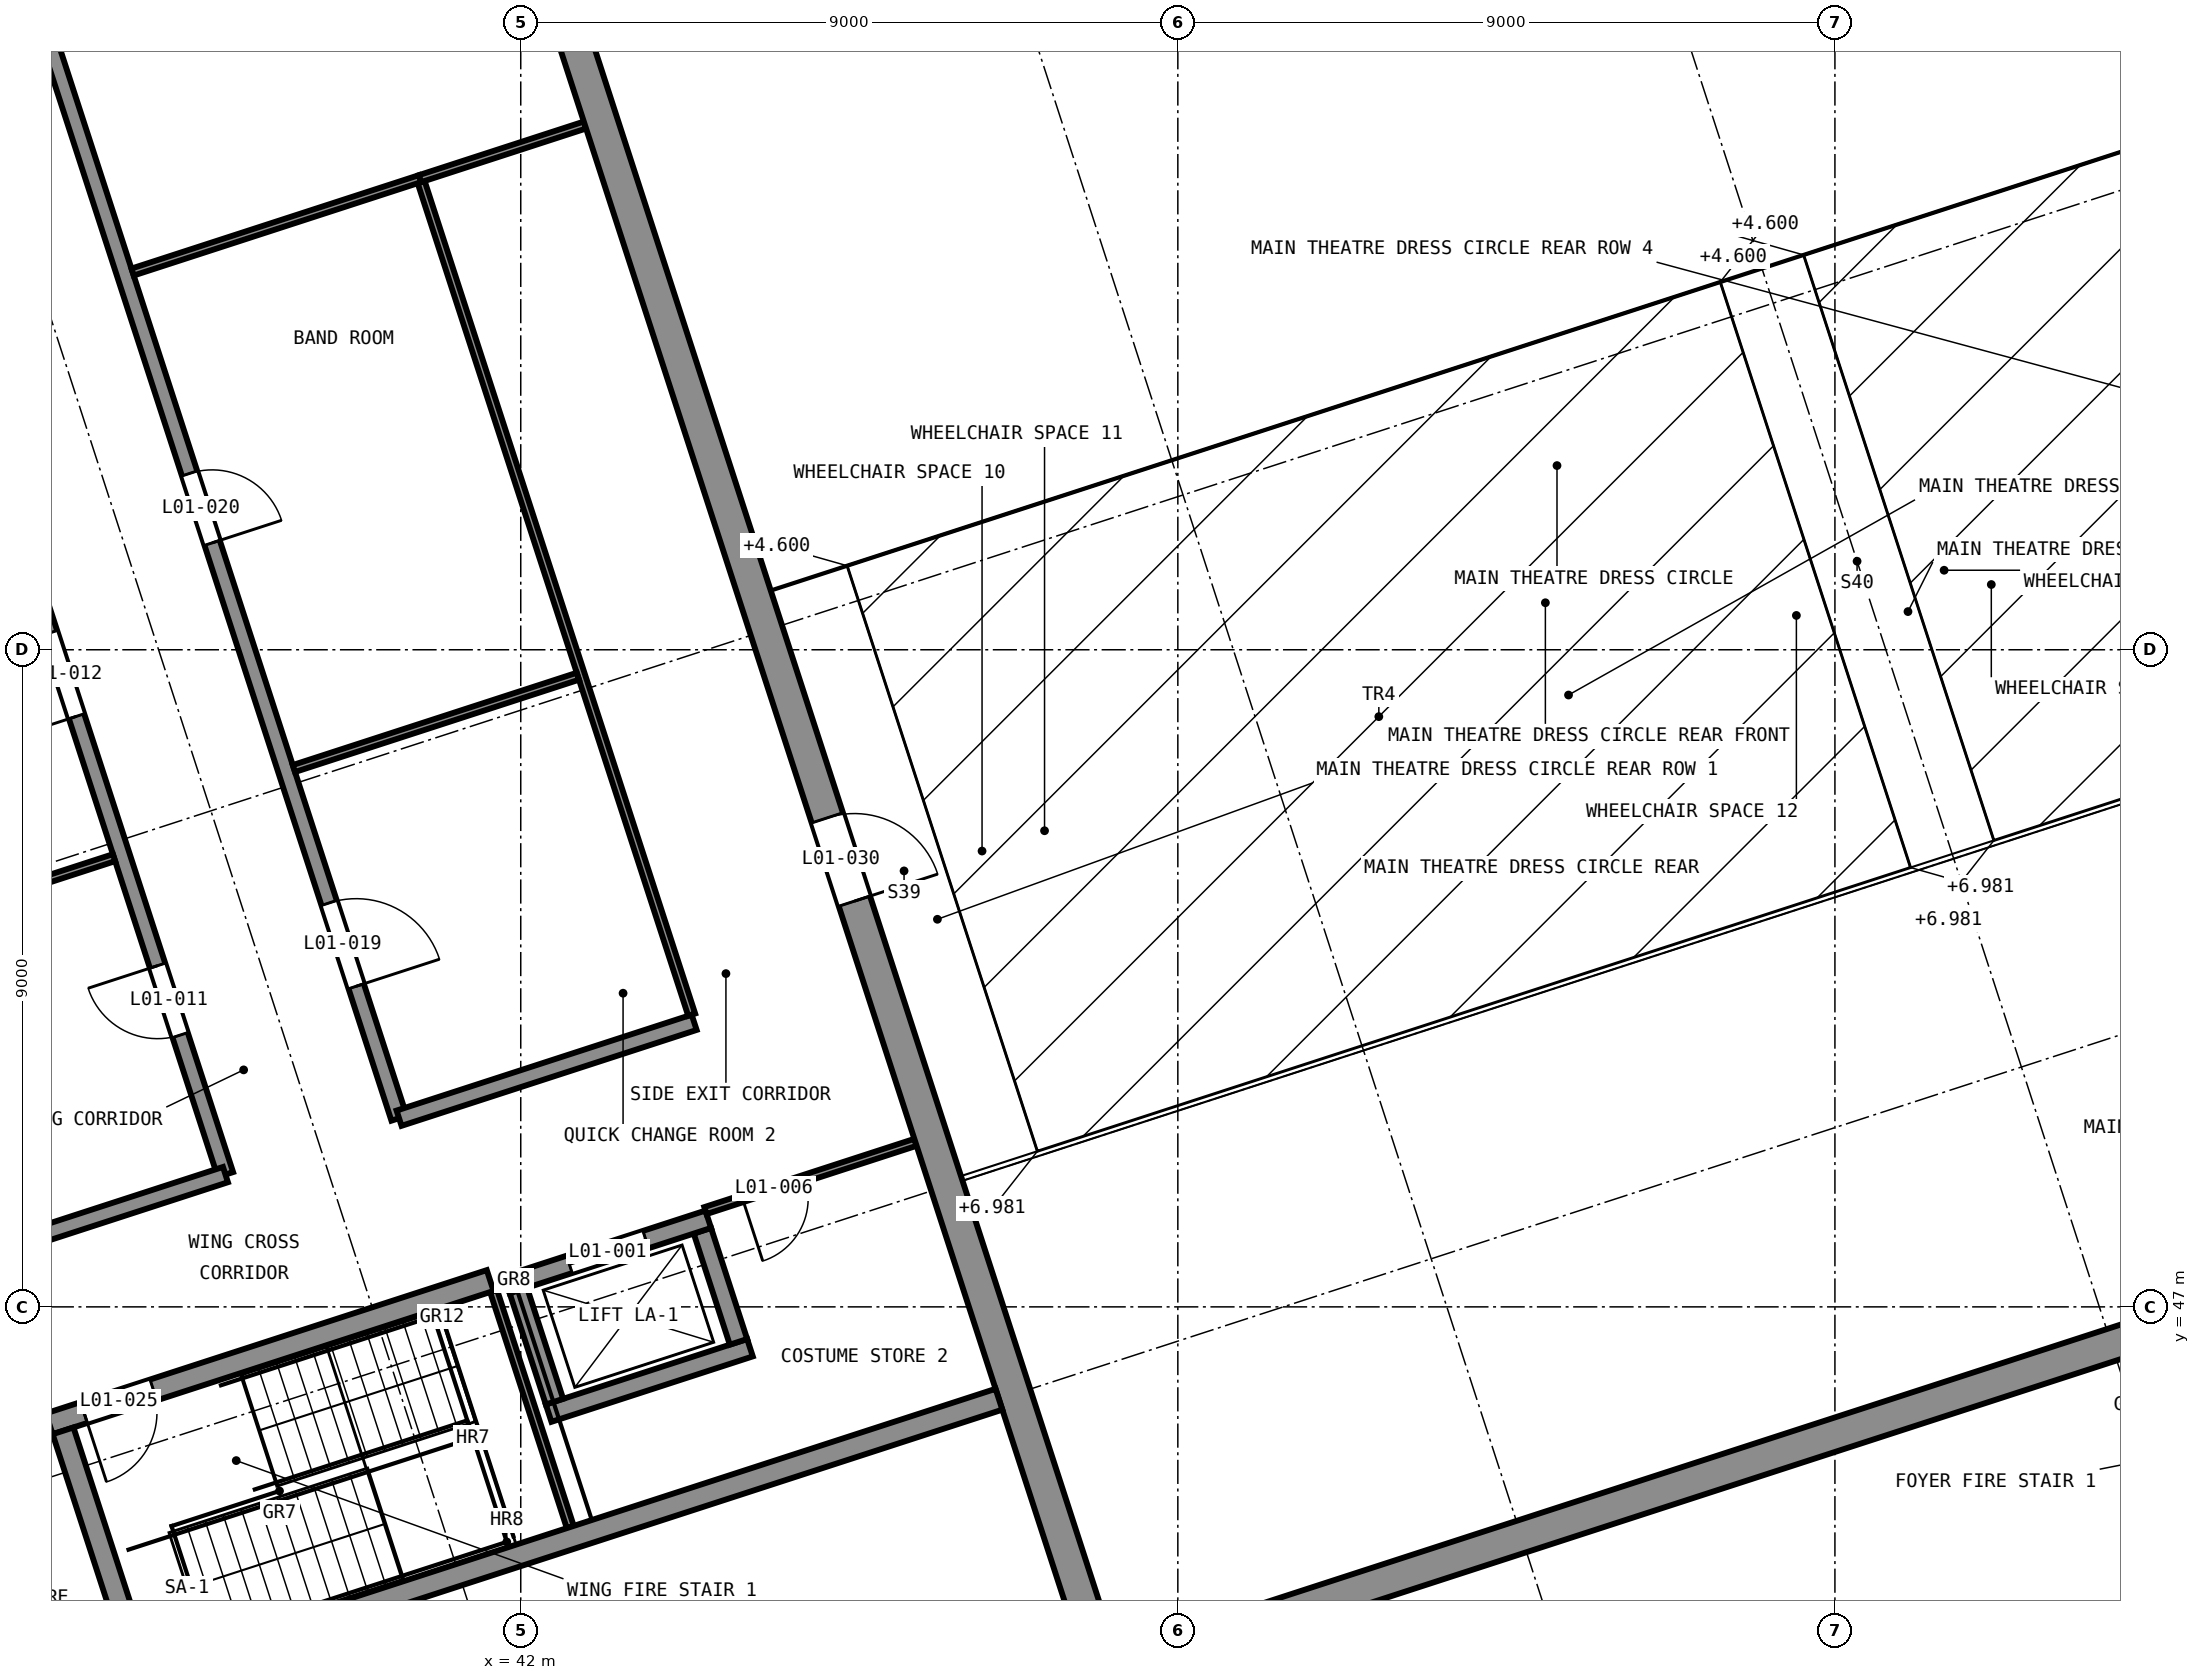
"""IFC4 building model, lengths in metres.
Left out: names, types, materials, properties, quantities, classifications, styles, units other than length and angle.
Written with IfcOpenShell. Run it as: python <this file> out.ifc"""

import sys

from ifc_helpers import new_model, si_unit, direction, frame, frame_2d, origin, place, context, subcontext, project, spatial, rectangle, extrude, element, fill, save


model = new_model("IFC4")
c1 = context("Model", 3, precision=1e-05, world=origin(), true_north=direction((0.0, 1.0)))
c2 = subcontext(c1, "Body", "Model", "MODEL_VIEW")
j1 = project(units=[si_unit("LENGTHUNIT", "METRE"), si_unit("PLANEANGLEUNIT", "RADIAN")], contexts=[c1])
p1 = place(None, origin())
s1 = spatial("IfcSite", under=j1, at=p1, CompositionType="ELEMENT")
p2 = place(p1, origin())
s2 = spatial("IfcBuilding", under=s1, at=p2, CompositionType="ELEMENT")
p3 = place(p2, frame((0.0, 0.0, 5.5)))
s3 = spatial("IfcBuildingStorey", under=s2, at=p3, CompositionType="ELEMENT", Elevation=5.5)
p4 = place(p3, frame((49.786, 41.93, 0.0), z_axis=(0.0, 0.0, 1.0), x_axis=(0.951055937194, 0.309018776661, 0.0)))
e1 = element("IfcWall", 1, at=p4, inside=s3, PredefinedType="SHEAR", context=c2, shape_type="SweptSolid", body=[
    extrude(rectangle(XDim=29.45, YDim=0.45, at=frame_2d((14.725, 0.0))), origin(), (0.0, 0.0, 1.0), 4.0),
])
p5 = place(p3, frame((49.93, 42.214, 0.0), z_axis=(0.0, 0.0, 1.0), x_axis=(-0.309016215614, 0.95105676933, 0.0)))
e2 = element("IfcWall", 2, at=p5, inside=s3, PredefinedType="SHEAR", context=c2, shape_type="SweptSolid", body=[
    extrude(rectangle(XDim=27.975, YDim=0.45, at=frame_2d((13.988, 0.0))), origin(), (0.0, 0.0, 1.0), 4.0),
])
p6 = place(p5, frame((10.875, 0.0, 0.0)))
e3 = element("IfcOpeningElement", 3, at=p6, cuts=e2, PredefinedType="OPENING", context=c2, shape_type="SweptSolid", body=[
    extrude(rectangle(XDim=1.2, YDim=2.1, at=frame_2d((0.6, 1.05))), frame((0.0, 0.235, 0.0), z_axis=(0.0, -1.0, 0.0), x_axis=(1.0, 0.0, 0.0)), (0.0, 0.0, 1.0), 0.47),
])
p7 = place(p3, frame((48.55, 45.735, 0.0), z_axis=(0.0, 0.0, 1.0), x_axis=(-0.951061216338, -0.309002528757, 0.0)))
e4 = element("IfcWall", 4, at=p7, inside=s3, PredefinedType="SOLIDWALL", context=c2, shape_type="SweptSolid", body=[
    extrude(rectangle(XDim=15.925, YDim=0.3, at=frame_2d((7.962, 0.0))), origin(), (0.0, 0.0, 1.0), 4.0),
])
p8 = place(p3, frame((41.581, 47.361, 0.0), z_axis=(0.0, 0.0, 1.0), x_axis=(-0.951058929949, -0.309009565815, 0.0)))
e5 = element("IfcWall", 5, at=p8, inside=s3, PredefinedType="SOLIDWALL", context=c2, shape_type="SweptSolid", body=[
    extrude(rectangle(XDim=6.35, YDim=0.3, at=frame_2d((3.175, 0.0))), origin(), (0.0, 0.0, 1.0), 3.7),
])
p9 = place(p8, frame((4.85, 0.0, 0.0)))
e6 = element("IfcOpeningElement", 6, at=p9, cuts=e5, PredefinedType="OPENING", context=c2, shape_type="SweptSolid", body=[
    extrude(rectangle(XDim=1.0, YDim=2.1, at=frame_2d((0.5, 1.05))), frame((0.0, 0.16, 0.0), z_axis=(0.0, -1.0, 0.0), x_axis=(1.0, 0.0, 0.0)), (0.0, 0.0, 1.0), 0.32),
])
p10 = place(p3, frame((35.731, 45.302, 0.0), z_axis=(0.0, 0.0, 1.0), x_axis=(0.308980533303, -0.951068362443, 0.0)))
e7 = element("IfcWall", 7, at=p10, inside=s3, PredefinedType="SOLIDWALL", context=c2, shape_type="SweptSolid", body=[
    extrude(rectangle(XDim=3.4, YDim=0.3, at=frame_2d((1.7, 0.0))), origin(), (0.0, 0.0, 1.0), 3.7),
])
p11 = place(p3, frame((42.382, 45.544, 0.0), z_axis=(0.0, 0.0, 1.0), x_axis=(0.951071801089, 0.308969948659, 0.0)))
e8 = element("IfcWall", 8, at=p11, inside=s3, PredefinedType="SHEAR", context=c2, shape_type="SweptSolid", body=[
    extrude(rectangle(XDim=2.9, YDim=0.25, at=frame_2d((1.45, 0.0))), origin(), (0.0, 0.0, 1.0), 4.0),
])
p12 = place(p3, frame((44.982, 46.521, 0.0), z_axis=(0.0, 0.0, 1.0), x_axis=(-0.308986014439, 0.951066581729, 0.0)))
e9 = element("IfcWall", 9, at=p12, inside=s3, PredefinedType="SHEAR", context=c2, shape_type="SweptSolid", body=[
    extrude(rectangle(XDim=1.6, YDim=0.25, at=frame_2d((0.8, 0.0))), origin(), (0.0, 0.0, 1.0), 4.0),
])
p13 = place(p3, frame((44.568, 48.2, 0.0), z_axis=(0.0, 0.0, 1.0), x_axis=(-0.951047059821, -0.309046096893, 0.0)))
e10 = element("IfcWall", 10, at=p13, inside=s3, PredefinedType="SHEAR", context=c2, shape_type="SweptSolid", body=[
    extrude(rectangle(XDim=2.9, YDim=0.25, at=frame_2d((1.45, 0.0))), origin(), (0.0, 0.0, 1.0), 4.0),
])
p14 = place(p13, frame((0.9, 0.0, 0.0)))
e11 = element("IfcOpeningElement", 11, at=p14, cuts=e10, PredefinedType="OPENING", context=c2, shape_type="SweptSolid", body=[
    extrude(rectangle(XDim=1.1, YDim=2.1, at=frame_2d((0.55, 1.05))), frame((0.0, 0.135, 0.0), z_axis=(0.0, -1.0, 0.0), x_axis=(1.0, 0.0, 0.0)), (0.0, 0.0, 1.0), 0.27),
])
p15 = place(p3, frame((41.968, 47.224, 0.0), z_axis=(0.0, 0.0, 1.0), x_axis=(0.308986014439, -0.951066581729, 0.0)))
e12 = element("IfcWall", 12, at=p15, inside=s3, PredefinedType="SHEAR", context=c2, shape_type="SweptSolid", body=[
    extrude(rectangle(XDim=1.6, YDim=0.25, at=frame_2d((0.8, 0.0))), origin(), (0.0, 0.0, 1.0), 4.0),
])
p16 = place(p3, frame((37.956, 48.812, 0.0), z_axis=(0.0, 0.0, 1.0), x_axis=(-0.30901736393, 0.951056396219, 0.0)))
e13 = element("IfcWall", 13, at=p16, inside=s3, PredefinedType="SOLIDWALL", context=c2, shape_type="SweptSolid", body=[
    extrude(rectangle(XDim=41.7, YDim=0.22, at=frame_2d((20.85, 0.0))), origin(), (0.0, 0.0, 1.0), 3.7),
])
p17 = place(p16, frame((2.009, 0.0, 0.0)))
e14 = element("IfcOpeningElement", 14, at=p17, cuts=e13, PredefinedType="OPENING", context=c2, shape_type="SweptSolid", body=[
    extrude(rectangle(XDim=1.0, YDim=2.1, at=frame_2d((0.5, 1.05))), frame((0.0, 0.12, 0.0), z_axis=(0.0, -1.0, 0.0), x_axis=(1.0, 0.0, 0.0)), (0.0, 0.0, 1.0), 0.24),
])
p18 = place(p16, frame((6.6, 0.0, 0.0)))
e15 = element("IfcOpeningElement", 15, at=p18, cuts=e13, PredefinedType="OPENING", context=c2, shape_type="SweptSolid", body=[
    extrude(rectangle(XDim=1.2, YDim=2.1, at=frame_2d((0.6, 1.05))), frame((0.0, 0.12, 0.0), z_axis=(0.0, -1.0, 0.0), x_axis=(1.0, 0.0, 0.0)), (0.0, 0.0, 1.0), 0.24),
])
p19 = place(p16, frame((11.7, 0.0, 0.0)))
e16 = element("IfcOpeningElement", 16, at=p19, cuts=e13, PredefinedType="OPENING", context=c2, shape_type="SweptSolid", body=[
    extrude(rectangle(XDim=1.2, YDim=2.1, at=frame_2d((0.6, 1.05))), frame((0.0, 0.12, 0.0), z_axis=(0.0, -1.0, 0.0), x_axis=(1.0, 0.0, 0.0)), (0.0, 0.0, 1.0), 0.24),
])
p20 = place(p16, frame((16.7, 0.0, 0.0)))
e17 = element("IfcOpeningElement", 17, at=p20, cuts=e13, PredefinedType="OPENING", context=c2, shape_type="SweptSolid", body=[
    extrude(rectangle(XDim=1.2, YDim=2.1, at=frame_2d((0.6, 1.05))), frame((0.0, 0.12, 0.0), z_axis=(0.0, -1.0, 0.0), x_axis=(1.0, 0.0, 0.0)), (0.0, 0.0, 1.0), 0.24),
])
p21 = place(p16, frame((21.7, 0.0, 0.0)))
e18 = element("IfcOpeningElement", 18, at=p21, cuts=e13, PredefinedType="OPENING", context=c2, shape_type="SweptSolid", body=[
    extrude(rectangle(XDim=1.2, YDim=2.1, at=frame_2d((0.6, 1.05))), frame((0.0, 0.12, 0.0), z_axis=(0.0, -1.0, 0.0), x_axis=(1.0, 0.0, 0.0)), (0.0, 0.0, 1.0), 0.24),
])
p22 = place(p16, frame((26.7, 0.0, 0.0)))
e19 = element("IfcOpeningElement", 19, at=p22, cuts=e13, PredefinedType="OPENING", context=c2, shape_type="SweptSolid", body=[
    extrude(rectangle(XDim=1.2, YDim=2.1, at=frame_2d((0.6, 1.05))), frame((0.0, 0.12, 0.0), z_axis=(0.0, -1.0, 0.0), x_axis=(1.0, 0.0, 0.0)), (0.0, 0.0, 1.0), 0.24),
])
p23 = place(p16, frame((31.739, 0.0, 0.0)))
e20 = element("IfcOpeningElement", 20, at=p23, cuts=e13, PredefinedType="OPENING", context=c2, shape_type="SweptSolid", body=[
    extrude(rectangle(XDim=1.2, YDim=2.1, at=frame_2d((0.6, 1.05))), frame((0.0, 0.12, 0.0), z_axis=(0.0, -1.0, 0.0), x_axis=(1.0, 0.0, 0.0)), (0.0, 0.0, 1.0), 0.24),
])
p24 = place(p3, frame((40.333, 49.584, 0.0), z_axis=(0.0, 0.0, 1.0), x_axis=(-0.309015643281, 0.951056955291, 0.0)))
e21 = element("IfcWall", 21, at=p24, inside=s3, PredefinedType="SOLIDWALL", context=c2, shape_type="SweptSolid", body=[
    extrude(rectangle(XDim=41.7, YDim=0.22, at=frame_2d((20.85, 0.0))), origin(), (0.0, 0.0, 1.0), 3.7),
])
p25 = place(p24, frame((1.9, 0.0, 0.0)))
e22 = element("IfcOpeningElement", 22, at=p25, cuts=e21, PredefinedType="OPENING", context=c2, shape_type="SweptSolid", body=[
    extrude(rectangle(XDim=1.2, YDim=2.1, at=frame_2d((0.6, 1.05))), frame((0.0, 0.12, 0.0), z_axis=(0.0, -1.0, 0.0), x_axis=(1.0, 0.0, 0.0)), (0.0, 0.0, 1.0), 0.24),
])
p26 = place(p24, frame((8.285, 0.0, 0.0)))
e23 = element("IfcOpeningElement", 23, at=p26, cuts=e21, PredefinedType="OPENING", context=c2, shape_type="SweptSolid", body=[
    extrude(rectangle(XDim=1.0, YDim=2.1, at=frame_2d((0.5, 1.05))), frame((0.0, 0.12, 0.0), z_axis=(0.0, -1.0, 0.0), x_axis=(1.0, 0.0, 0.0)), (0.0, 0.0, 1.0), 0.24),
])
p27 = place(p24, frame((16.375, 0.0, 0.0)))
e24 = element("IfcOpeningElement", 24, at=p27, cuts=e21, PredefinedType="OPENING", context=c2, shape_type="SweptSolid", body=[
    extrude(rectangle(XDim=1.2, YDim=2.1, at=frame_2d((0.6, 1.05))), frame((0.0, 0.12, 0.0), z_axis=(0.0, -1.0, 0.0), x_axis=(1.0, 0.0, 0.0)), (0.0, 0.0, 1.0), 0.24),
])
p28 = place(p24, frame((25.752, 0.0, 0.0)))
e25 = element("IfcOpeningElement", 25, at=p28, cuts=e21, PredefinedType="OPENING", context=c2, shape_type="SweptSolid", body=[
    extrude(rectangle(XDim=1.0, YDim=2.1, at=frame_2d((0.5, 1.05))), frame((0.0, 0.12, 0.0), z_axis=(0.0, -1.0, 0.0), x_axis=(1.0, 0.0, 0.0)), (0.0, 0.0, 1.0), 0.24),
])
p29 = place(p24, frame((32.761, 0.0, 0.0)))
e26 = element("IfcOpeningElement", 26, at=p29, cuts=e21, PredefinedType="OPENING", context=c2, shape_type="SweptSolid", body=[
    extrude(rectangle(XDim=1.0, YDim=2.1, at=frame_2d((0.5, 1.05))), frame((0.0, 0.12, 0.0), z_axis=(0.0, -1.0, 0.0), x_axis=(1.0, 0.0, 0.0)), (0.0, 0.0, 1.0), 0.24),
])
p30 = place(p3, frame((34.817, 47.792, 0.0), z_axis=(0.0, 0.0, 1.0), x_axis=(0.951053095941, 0.309027520945, 0.0)))
e27 = element("IfcWall", 27, at=p30, inside=s3, PredefinedType="SOLIDWALL", context=c2, shape_type="SweptSolid", body=[
    extrude(rectangle(XDim=3.3, YDim=0.22, at=frame_2d((1.65, 0.0))), origin(), (0.0, 0.0, 1.0), 3.7),
])
p31 = place(p3, frame((40.333, 49.584, 0.0), z_axis=(0.0, 0.0, 1.0), x_axis=(0.951062770994, 0.308997743729, 0.0)))
e28 = element("IfcWall", 28, at=p31, inside=s3, PredefinedType="SOLIDWALL", context=c2, shape_type="SweptSolid", body=[
    extrude(rectangle(XDim=4.25, YDim=0.22, at=frame_2d((2.125, 0.0))), origin(), (0.0, 0.0, 1.0), 3.7),
])
p32 = place(p3, frame((44.53, 48.319, 0.0), z_axis=(0.0, 0.0, 1.0), x_axis=(0.951053046121, 0.30902767427, 0.0)))
e29 = element("IfcWall", 29, at=p32, inside=s3, PredefinedType="PARTITIONING", context=c2, shape_type="SweptSolid", body=[
    extrude(rectangle(XDim=3.025, YDim=0.1, at=frame_2d((1.512, 0.0))), origin(), (0.0, 0.0, 1.0), 3.7),
])
p33 = place(p32, frame((0.533, 0.0, 0.0)))
e30 = element("IfcOpeningElement", 30, at=p33, cuts=e29, PredefinedType="OPENING", context=c2, shape_type="SweptSolid", body=[
    extrude(rectangle(XDim=0.9, YDim=2.1, at=frame_2d((0.45, 1.05))), frame((0.0, 0.06, 0.0), z_axis=(0.0, -1.0, 0.0), x_axis=(1.0, 0.0, 0.0)), (0.0, 0.0, 1.0), 0.12),
])
p34 = place(p3, frame((33.396, 52.167, 0.0), z_axis=(0.0, 0.0, 1.0), x_axis=(0.951044192343, 0.309054921027, 0.0)))
e31 = element("IfcWall", 31, at=p34, inside=s3, PredefinedType="PARTITIONING", context=c2, shape_type="SweptSolid", body=[
    extrude(rectangle(XDim=3.19, YDim=0.1, at=frame_2d((1.595, 0.0))), origin(), (0.0, 0.0, 1.0), 3.7),
])
p35 = place(p3, frame((38.893, 54.373, 0.0), z_axis=(0.0, 0.0, 1.0), x_axis=(0.951055560564, 0.309019935796, 0.0)))
e32 = element("IfcWall", 32, at=p35, inside=s3, PredefinedType="PARTITIONING", context=c2, shape_type="SweptSolid", body=[
    extrude(rectangle(XDim=4.09, YDim=0.1, at=frame_2d((2.045, 0.0))), origin(), (0.0, 0.0, 1.0), 3.7),
])
p36 = place(p3, frame((36.683, 61.173, 0.0), z_axis=(0.0, 0.0, 1.0), x_axis=(0.95105616864, 0.309018064344, 0.0)))
e33 = element("IfcWall", 33, at=p36, inside=s3, PredefinedType="PARTITIONING", context=c2, shape_type="SweptSolid", body=[
    extrude(rectangle(XDim=4.14, YDim=0.1, at=frame_2d((2.07, 0.0))), origin(), (0.0, 0.0, 1.0), 3.7),
])
p37 = place(p3, frame((40.621, 62.453, 0.0), z_axis=(0.0, 0.0, 1.0), x_axis=(0.951061260164, 0.309002393867, 0.0)))
e34 = element("IfcWall", 34, at=p37, inside=s3, PredefinedType="PARTITIONING", context=c2, shape_type="SweptSolid", body=[
    extrude(rectangle(XDim=2.375, YDim=0.1, at=frame_2d((1.188, 0.0))), origin(), (0.0, 0.0, 1.0), 3.7),
])
p38 = place(p3, frame((42.678, 43.985, 0.0), z_axis=(0.0, 0.0, 1.0), x_axis=(-0.309045481752, 0.951047259714, 0.0)))
e35 = element("IfcWall", 35, at=p38, inside=s3, PredefinedType="PARTITIONING", context=c2, shape_type="SweptSolid", body=[
    extrude(rectangle(XDim=3.4, YDim=0.1, at=frame_2d((1.7, 0.0))), origin(), (0.0, 0.0, 1.0), 3.7),
])
p39 = place(p3, frame((44.341, 51.002, 0.0), z_axis=(0.0, 0.0, 1.0), x_axis=(-0.309016547708, 0.951056661426, 0.0)))
e36 = element("IfcWall", 36, at=p39, inside=s3, PredefinedType="PARTITIONING", context=c2, shape_type="SweptSolid", body=[
    extrude(rectangle(XDim=11.99, YDim=0.1, at=frame_2d((5.995, 0.0))), origin(), (0.0, 0.0, 1.0), 3.7),
])
p40 = place(p14, origin())
e37 = element("IfcDoor", 37, at=p40, inside=s3, OperationType="SLIDING_TO_LEFT", PredefinedType="DOOR", context=c2, shape_type="SweptSolid", body=[
    extrude(rectangle(XDim=1.1, YDim=2.1, at=frame_2d((0.55, 1.05))), frame((0.0, 0.025, 0.0), z_axis=(0.0, -1.0, 0.0), x_axis=(1.0, 0.0, 0.0)), (0.0, 0.0, 1.0), 0.05),
])
fill(e11, e37)
p41 = place(p33, frame((0.9, 0.0, 0.0), z_axis=(0.0, 0.0, 1.0), x_axis=(-1.0, 0.0, 0.0)))
e38 = element("IfcDoor", 38, at=p41, inside=s3, OperationType="SINGLE_SWING_LEFT", PredefinedType="DOOR", context=c2, shape_type="SweptSolid", body=[
    extrude(rectangle(XDim=0.9, YDim=2.1, at=frame_2d((0.45, 1.05))), frame((0.0, 0.025, 0.0), z_axis=(0.0, -1.0, 0.0), x_axis=(1.0, 0.0, 0.0)), (0.0, 0.0, 1.0), 0.05),
])
fill(e30, e38)
p42 = place(p17, origin())
e39 = element("IfcDoor", 39, at=p42, inside=s3, OperationType="SINGLE_SWING_LEFT", PredefinedType="DOOR", context=c2, shape_type="SweptSolid", body=[
    extrude(rectangle(XDim=1.0, YDim=2.1, at=frame_2d((0.5, 1.05))), frame((0.0, 0.025, 0.0), z_axis=(0.0, -1.0, 0.0), x_axis=(1.0, 0.0, 0.0)), (0.0, 0.0, 1.0), 0.05),
])
fill(e14, e39)
p43 = place(p18, origin())
e40 = element("IfcDoor", 40, at=p43, inside=s3, OperationType="SINGLE_SWING_RIGHT", PredefinedType="DOOR", context=c2, shape_type="SweptSolid", body=[
    extrude(rectangle(XDim=1.2, YDim=2.1, at=frame_2d((0.6, 1.05))), frame((0.0, 0.025, 0.0), z_axis=(0.0, -1.0, 0.0), x_axis=(1.0, 0.0, 0.0)), (0.0, 0.0, 1.0), 0.05),
])
fill(e15, e40)
p44 = place(p25, frame((1.2, 0.0, 0.0), z_axis=(0.0, 0.0, 1.0), x_axis=(-1.0, 0.0, 0.0)))
e41 = element("IfcDoor", 41, at=p44, inside=s3, OperationType="SINGLE_SWING_LEFT", PredefinedType="DOOR", context=c2, shape_type="SweptSolid", body=[
    extrude(rectangle(XDim=1.2, YDim=2.1, at=frame_2d((0.6, 1.05))), frame((0.0, 0.025, 0.0), z_axis=(0.0, -1.0, 0.0), x_axis=(1.0, 0.0, 0.0)), (0.0, 0.0, 1.0), 0.05),
])
fill(e22, e41)
p45 = place(p26, frame((1.0, 0.0, 0.0), z_axis=(0.0, 0.0, 1.0), x_axis=(-1.0, 0.0, 0.0)))
e42 = element("IfcDoor", 42, at=p45, inside=s3, OperationType="SINGLE_SWING_LEFT", PredefinedType="DOOR", context=c2, shape_type="SweptSolid", body=[
    extrude(rectangle(XDim=1.0, YDim=2.1, at=frame_2d((0.5, 1.05))), frame((0.0, 0.025, 0.0), z_axis=(0.0, -1.0, 0.0), x_axis=(1.0, 0.0, 0.0)), (0.0, 0.0, 1.0), 0.05),
])
fill(e23, e42)
p46 = place(p9, origin())
e43 = element("IfcDoor", 43, at=p46, inside=s3, OperationType="SINGLE_SWING_LEFT", PredefinedType="DOOR", context=c2, shape_type="SweptSolid", body=[
    extrude(rectangle(XDim=1.0, YDim=2.1, at=frame_2d((0.5, 1.05))), frame((0.0, 0.025, 0.0), z_axis=(0.0, -1.0, 0.0), x_axis=(1.0, 0.0, 0.0)), (0.0, 0.0, 1.0), 0.05),
])
fill(e6, e43)
p47 = place(p6, frame((1.2, 0.0, 0.0), z_axis=(0.0, 0.0, 1.0), x_axis=(-1.0, 0.0, 0.0)))
e44 = element("IfcDoor", 44, at=p47, inside=s3, OperationType="SINGLE_SWING_LEFT", PredefinedType="DOOR", context=c2, shape_type="SweptSolid", body=[
    extrude(rectangle(XDim=1.2, YDim=2.1, at=frame_2d((0.6, 1.05))), frame((0.0, 0.025, 0.0), z_axis=(0.0, -1.0, 0.0), x_axis=(1.0, 0.0, 0.0)), (0.0, 0.0, 1.0), 0.05),
])
fill(e3, e44)
save(model, sys.argv[1])
